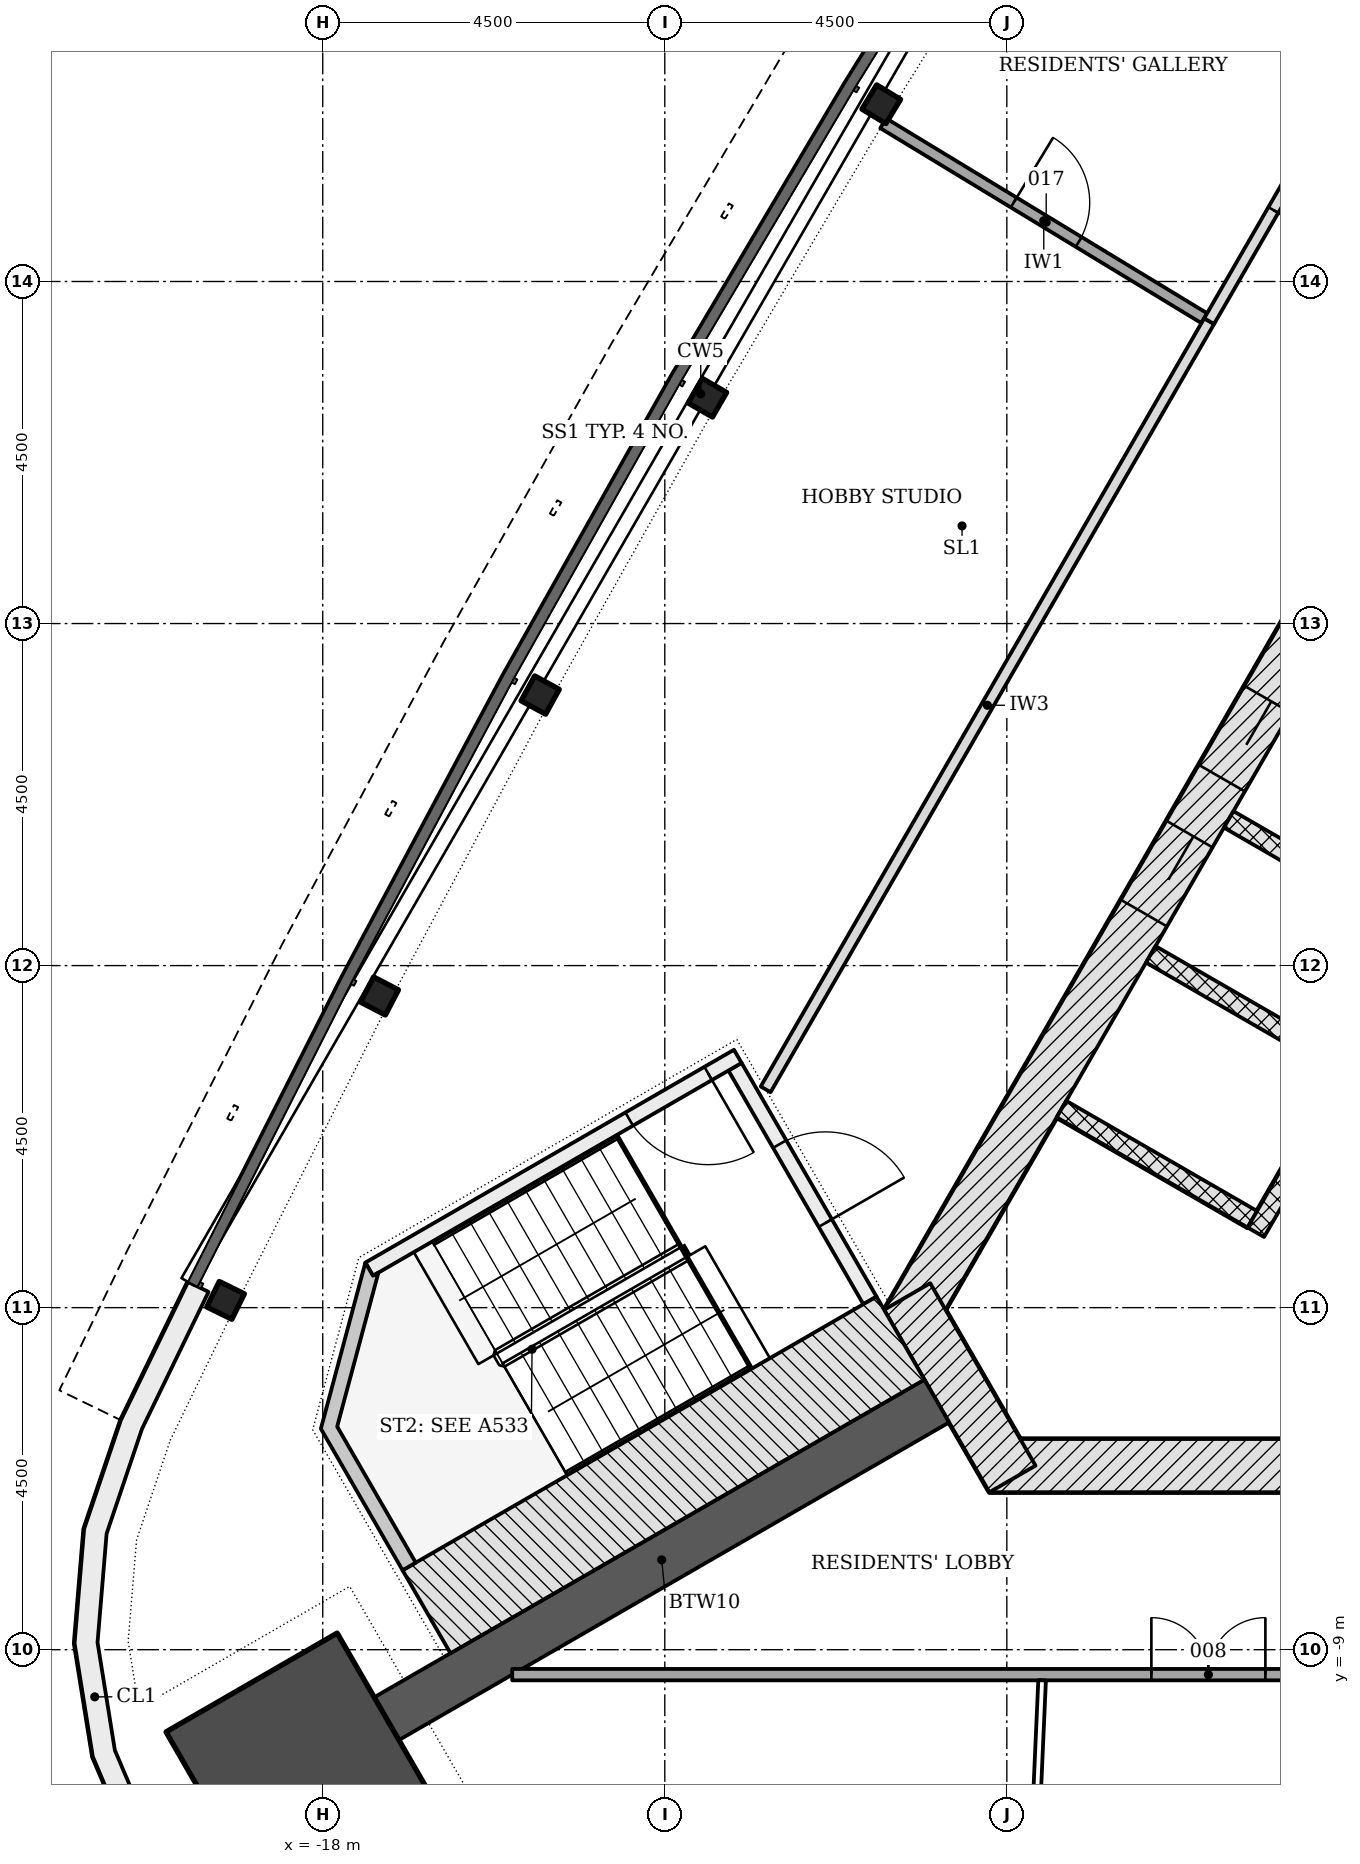
"""IFC4 building model, lengths in metres.
Left out: names, types, materials, properties, quantities, classifications, styles, units other than length and angle.
Written with IfcOpenShell. Run it as: python <this file> out.ifc"""

import sys

from ifc_helpers import new_model, si_unit, direction, frame, frame_2d, origin, origin_2d, place, context, subcontext, project, spatial, polyline, rectangle, i_section, outline, extrude, element, fill, save


model = new_model("IFC4")
c1 = context("Model", 3, precision=1e-05, world=origin(), true_north=direction((0.0, 1.0)))
c2 = subcontext(c1, "Body", "Model", "MODEL_VIEW")
j1 = project(units=[si_unit("LENGTHUNIT", "METRE"), si_unit("PLANEANGLEUNIT", "RADIAN")], contexts=[c1])
p1 = place(None, origin())
s1 = spatial("IfcSite", under=j1, at=p1, CompositionType="ELEMENT")
p2 = place(p1, origin())
s2 = spatial("IfcBuilding", under=s1, at=p2, CompositionType="ELEMENT")
p3 = place(p2, frame((0.0, 0.0, 222.0)))
s3 = spatial("IfcBuildingStorey", under=s2, at=p3, CompositionType="ELEMENT", Elevation=222.0)
p4 = place(p3, frame((-9.229, -6.578, -0.2), z_axis=(0.0, 0.0, 1.0), x_axis=(1.0, 0.0, 0.0)))
e1 = element("IfcWall", 1, at=p4, inside=s3, PredefinedType="SHEAR", context=c2, shape_type="SweptSolid", body=[
    extrude(rectangle(XDim=18.458, YDim=0.7, at=frame_2d((9.229, 0.0))), origin(), (0.0, 0.0, 1.0), 3.6),
])
p5 = place(p4, frame((10.7, 0.0, 0.2)))
e2 = element("IfcOpeningElement", 2, at=p5, cuts=e1, PredefinedType="OPENING", context=c2, shape_type="SweptSolid", body=[
    extrude(rectangle(XDim=1.0, YDim=2.1, at=frame_2d((0.5, 1.05))), frame((0.0, 0.36, 0.0), z_axis=(0.0, -1.0, 0.0), x_axis=(1.0, 0.0, 0.0)), (0.0, 0.0, 1.0), 0.72),
])
p6 = place(p4, frame((4.977, 0.0, 0.2)))
e3 = element("IfcOpeningElement", 3, at=p6, cuts=e1, PredefinedType="OPENING", context=c2, shape_type="SweptSolid", body=[
    extrude(rectangle(XDim=0.9, YDim=2.1, at=frame_2d((0.45, 1.05))), frame((0.0, 0.36, 0.0), z_axis=(0.0, -1.0, 0.0), x_axis=(1.0, 0.0, 0.0)), (0.0, 0.0, 1.0), 0.72),
])
p7 = place(p4, frame((14.552, 0.0, 0.2)))
e4 = element("IfcOpeningElement", 4, at=p7, cuts=e1, PredefinedType="OPENING", context=c2, shape_type="SweptSolid", body=[
    extrude(rectangle(XDim=0.9, YDim=2.1, at=frame_2d((0.45, 1.05))), frame((0.0, 0.36, 0.0), z_axis=(0.0, -1.0, 0.0), x_axis=(1.0, 0.0, 0.0)), (0.0, 0.0, 1.0), 0.72),
])
p8 = place(p3, frame((-1.083, 11.281, -0.2), z_axis=(0.0, 0.0, 1.0), x_axis=(-0.500001446645, -0.866024568562, 0.0)))
e5 = element("IfcWall", 5, at=p8, inside=s3, PredefinedType="SHEAR", context=c2, shape_type="SweptSolid", body=[
    extrude(rectangle(XDim=18.458, YDim=0.7, at=frame_2d((9.229, 0.0))), origin(), (0.0, 0.0, 1.0), 3.6),
])
p9 = place(p8, frame((8.979, 0.0, 0.2)))
e6 = element("IfcOpeningElement", 6, at=p9, cuts=e5, PredefinedType="OPENING", context=c2, shape_type="SweptSolid", body=[
    extrude(rectangle(XDim=1.2, YDim=2.1, at=frame_2d((0.6, 1.05))), frame((0.0, 0.36, 0.0), z_axis=(0.0, -1.0, 0.0), x_axis=(1.0, 0.0, 0.0)), (0.0, 0.0, 1.0), 0.72),
])
p10 = place(p8, frame((11.029, 0.0, 0.2)))
e7 = element("IfcOpeningElement", 7, at=p10, cuts=e5, PredefinedType="OPENING", context=c2, shape_type="SweptSolid", body=[
    extrude(rectangle(XDim=1.2, YDim=2.1, at=frame_2d((0.6, 1.05))), frame((0.0, 0.36, 0.0), z_axis=(0.0, -1.0, 0.0), x_axis=(1.0, 0.0, 0.0)), (0.0, 0.0, 1.0), 0.72),
])
p11 = place(p3, frame((-10.311, -4.353, -0.2), z_axis=(0.0, 0.0, 1.0), x_axis=(0.500042739161, -0.866000726912, 0.0)))
e8 = element("IfcWall", 8, at=p11, inside=s3, PredefinedType="SHEAR", context=c2, shape_type="SweptSolid", body=[
    extrude(rectangle(XDim=2.771, YDim=0.7, at=frame_2d((1.386, 0.0))), origin(), (0.0, 0.0, 1.0), 3.6),
])
p12 = place(p3, frame((-9.922, -5.728, -0.2), z_axis=(0.0, 0.0, 1.0), x_axis=(-0.866030911543, -0.499990460161, 0.0)))
e9 = element("IfcWall", 9, at=p12, inside=s3, PredefinedType="SHEAR", context=c2, shape_type="SweptSolid", body=[
    extrude(rectangle(XDim=8.359, YDim=0.65, at=frame_2d((4.179, 0.0))), origin(), (0.0, 0.0, 1.0), 3.6),
])
p13 = place(p3, frame((-18.286, -10.558, -0.2), z_axis=(0.0, 0.0, 1.0), x_axis=(-0.866025403784, -0.5, 0.0)))
e10 = element("IfcColumn", 10, at=p13, inside=s3, PredefinedType="COLUMN", context=c2, shape_type="SweptSolid", body=[
    extrude(rectangle(XDim=2.6, YDim=2.6, at=origin_2d()), origin(), (0.0, 0.0, 1.0), 3.6),
])
for number, where, z_axis, x_axis in (
    (11, (-10.652, 11.332, -0.2), (0.0, 0.0, 1.0), (-0.519, -0.855, 0.0)),
    (12, (-12.939, 7.47, -0.2), (0.0, 0.0, 1.0), (-0.5, -0.866, 0.0)),
    (13, (-15.14, 3.559, -0.2), (0.0, 0.0, 1.0), (-0.481, -0.877, 0.0)),
    (14, (-17.253, -0.4, -0.2), (0.0, 0.0, 1.0), (-0.461, -0.887, 0.0)),
    (15, (-19.279, -4.404, -0.2), (0.0, 0.0, 1.0), (-0.441, -0.897, 0.0)),
):
    element("IfcColumn", number, at=place(p3, frame(where, z_axis=z_axis, x_axis=x_axis)), inside=s3, PredefinedType="COLUMN", context=c2, shape_type="SweptSolid", body=[
        extrude(i_section(OverallWidth=0.373, OverallDepth=0.368, WebThickness=0.015, FlangeThickness=0.024, FilletRadius=0.015, at=origin_2d()), origin(), (0.0, 0.0, 1.0), 3.6),
    ])
p14 = place(p3, origin())
e16 = element("IfcWall", 16, at=p14, inside=s3, PredefinedType="NOTDEFINED", context=c2, shape_type="SweptSolid", body=[
    extrude(outline(polyline([(-19.772, -4.162), (-20.656, -5.98), (-21.139, -7.411), (-21.265, -8.917), (-21.025, -10.408), (-20.434, -11.797), (-19.526, -13.004), (-18.354, -13.958), (-16.988, -14.602), (-15.507, -14.898), (-15.448, -14.604), (-16.893, -14.315), (-18.193, -13.702), (-19.308, -12.795), (-20.172, -11.646), (-20.735, -10.324), (-20.963, -8.905), (-20.844, -7.473), (-20.378, -6.094), (-19.502, -4.293), (-19.772, -4.162)])), origin(), (0.0, 0.0, 1.0), 3.3),
])
for number, where, z_axis, x_axis in (
    (17, (-6.081, 1.923, -0.2), (0.0, 0.0, 1.0), (0.866, -0.5, 0.0)),
    (18, (-7.106, 0.148, -0.2), (0.0, 0.0, 1.0), (0.866, -0.5, 0.0)),
    (19, (-8.281, -1.887, -0.2), (0.0, 0.0, 1.0), (0.866, -0.5, 0.0)),
):
    element("IfcWall", number, at=place(p3, frame(where, z_axis=z_axis, x_axis=x_axis)), inside=s3, PredefinedType="PARTITIONING", context=c2, shape_type="SweptSolid", body=[
        extrude(rectangle(XDim=2.9, YDim=0.25, at=frame_2d((1.45, 0.0))), origin(), (0.0, 0.0, 1.0), 3.6),
    ])
p15 = place(p3, frame((-2.374, 2.294, 0.0), z_axis=(0.0, 0.0, 1.0), x_axis=(-0.500003174267, -0.866023571113, 0.0)))
e20 = element("IfcWall", 20, at=p15, inside=s3, PredefinedType="PARTITIONING", context=c2, shape_type="SweptSolid", body=[
    extrude(rectangle(XDim=6.7, YDim=0.25, at=frame_2d((3.35, 0.0))), origin(), (0.0, 0.0, 1.0), 3.4),
])
p16 = place(p3, frame((-12.576, -1.331, -0.2), z_axis=(0.0, 0.0, 1.0), x_axis=(0.499970499736, -0.8660424351, 0.0)))
e21 = element("IfcWall", 21, at=p16, inside=s3, PredefinedType="SHEAR", context=c2, shape_type="SweptSolid", body=[
    extrude(rectangle(XDim=3.55, YDim=0.2, at=frame_2d((1.775, 0.0))), origin(), (0.0, 0.0, 1.0), 3.6),
])
p17 = place(p16, frame((1.175, 0.0, 0.2)))
e22 = element("IfcOpeningElement", 22, at=p17, cuts=e21, PredefinedType="OPENING", context=c2, shape_type="SweptSolid", body=[
    extrude(rectangle(XDim=1.2, YDim=2.1, at=frame_2d((0.6, 1.05))), frame((0.0, 0.11, 0.0), z_axis=(0.0, -1.0, 0.0), x_axis=(1.0, 0.0, 0.0)), (0.0, 0.0, 1.0), 0.22),
])
p18 = place(p3, frame((-12.539, -1.194, -0.2), z_axis=(0.0, 0.0, 1.0), x_axis=(-0.866045472092, -0.499965239061, 0.0)))
e23 = element("IfcWall", 23, at=p18, inside=s3, PredefinedType="SHEAR", context=c2, shape_type="SweptSolid", body=[
    extrude(rectangle(XDim=5.6, YDim=0.2, at=frame_2d((2.8, 0.0))), origin(), (0.0, 0.0, 1.0), 3.6),
])
p19 = place(p18, frame((0.45, 0.0, 0.2)))
e24 = element("IfcOpeningElement", 24, at=p19, cuts=e23, PredefinedType="OPENING", context=c2, shape_type="SweptSolid", body=[
    extrude(rectangle(XDim=1.2, YDim=2.1, at=frame_2d((0.6, 1.05))), frame((0.0, 0.11, 0.0), z_axis=(0.0, -1.0, 0.0), x_axis=(1.0, 0.0, 0.0)), (0.0, 0.0, 1.0), 0.22),
])
p20 = place(p3, frame((-10.399, -4.901, -0.2), z_axis=(0.0, 0.0, 1.0), x_axis=(-0.866018442252, -0.500012057535, 0.0)))
e25 = element("IfcWall", 25, at=p20, inside=s3, PredefinedType="SHEAR", context=c2, shape_type="SweptSolid", body=[
    extrude(rectangle(XDim=7.2, YDim=1.261, at=frame_2d((3.6, 0.0))), origin(), (0.0, 0.0, 1.0), 3.6),
])
p21 = place(p3, frame((0.0, 0.0, -0.2)))
e26 = element("IfcWall", 26, at=p21, inside=s3, PredefinedType="SHEAR", context=c2, shape_type="SweptSolid", body=[
    extrude(outline(polyline([(-17.439, -3.907), (-18.025, -6.093), (-16.95, -7.955), (-16.777, -7.855), (-17.81, -6.065), (-17.267, -4.039), (-17.339, -4.081), (-17.339, -4.081), (-17.339, -4.081), (-17.339, -4.081), (-17.339, -4.081), (-17.339, -4.081), (-17.339, -4.081), (-17.339, -4.081), (-17.339, -4.081), (-17.339, -4.081), (-17.339, -4.081), (-17.339, -4.081), (-17.339, -4.081), (-17.339, -4.081), (-17.339, -4.081), (-17.339, -4.081), (-17.339, -4.081), (-17.439, -3.907)])), origin(), (0.0, 0.0, 1.0), 3.6),
])
p22 = place(p3, frame((-15.507, -9.328, 0.0), z_axis=(0.0, 0.0, 1.0), x_axis=(1.0, 0.0, 0.0)))
e27 = element("IfcWall", 27, at=p22, inside=s3, PredefinedType="PARTITIONING", context=c2, shape_type="SweptSolid", body=[
    extrude(rectangle(XDim=23.234, YDim=0.15, at=frame_2d((11.617, 0.0))), origin(), (0.0, 0.0, 1.0), 2.852),
])
p23 = place(p22, frame((8.408, 0.0, 0.0)))
e28 = element("IfcOpeningElement", 28, at=p23, cuts=e27, PredefinedType="OPENING", context=c2, shape_type="SweptSolid", body=[
    extrude(rectangle(XDim=1.5, YDim=2.1, at=frame_2d((0.75, 1.05))), frame((0.0, 0.085, 0.0), z_axis=(0.0, -1.0, 0.0), x_axis=(1.0, 0.0, 0.0)), (0.0, 0.0, 1.0), 0.17),
])
p24 = place(p22, frame((18.971, 0.0, 0.0)))
e29 = element("IfcOpeningElement", 29, at=p24, cuts=e27, PredefinedType="OPENING", context=c2, shape_type="SweptSolid", body=[
    extrude(rectangle(XDim=1.0, YDim=2.1, at=frame_2d((0.5, 1.05))), frame((0.0, 0.085, 0.0), z_axis=(0.0, -1.0, 0.0), x_axis=(1.0, 0.0, 0.0)), (0.0, 0.0, 1.0), 0.17),
])
p25 = place(p3, frame((-8.536, -9.403, 0.0), z_axis=(0.0, 0.0, 1.0), x_axis=(-0.044201203498, -0.999022649197, 0.0)))
e30 = element("IfcWall", 30, at=p25, inside=s3, PredefinedType="PARTITIONING", context=c2, shape_type="SweptSolid", body=[
    extrude(rectangle(XDim=3.883, YDim=0.1, at=frame_2d((1.941, 0.0))), origin(), (0.0, 0.0, 1.0), 3.4),
])
p26 = place(p25, frame((1.404, 0.0, 0.0)))
e31 = element("IfcOpeningElement", 31, at=p26, cuts=e30, PredefinedType="OPENING", context=c2, shape_type="SweptSolid", body=[
    extrude(rectangle(XDim=1.0, YDim=2.1, at=frame_2d((0.5, 1.05))), frame((0.0, 0.06, 0.0), z_axis=(0.0, -1.0, 0.0), x_axis=(1.0, 0.0, 0.0)), (0.0, 0.0, 1.0), 0.12),
])
p27 = place(p3, frame((-6.338, 8.478, 0.0), z_axis=(0.0, 0.0, 1.0), x_axis=(-0.499993497815, -0.86602915779, 0.0)))
e32 = element("IfcWall", 32, at=p27, inside=s3, PredefinedType="PARTITIONING", context=c2, shape_type="SweptSolid", body=[
    extrude(rectangle(XDim=11.67, YDim=0.15, at=frame_2d((5.835, 0.0))), origin(), (0.0, 0.0, 1.0), 2.852),
])
p28 = place(p3, frame((-10.626, 11.082, 0.0), z_axis=(0.0, 0.0, 1.0), x_axis=(0.854742891139, -0.519051625609, 0.0)))
e33 = element("IfcWall", 33, at=p28, inside=s3, PredefinedType="PARTITIONING", context=c2, shape_type="SweptSolid", body=[
    extrude(rectangle(XDim=4.941, YDim=0.15, at=frame_2d((2.471, 0.0))), origin(), (0.0, 0.0, 1.0), 3.4),
])
p29 = place(p28, frame((2.008, 0.0, 0.0)))
e34 = element("IfcOpeningElement", 34, at=p29, cuts=e33, PredefinedType="OPENING", context=c2, shape_type="SweptSolid", body=[
    extrude(rectangle(XDim=1.0, YDim=2.1, at=frame_2d((0.5, 1.05))), frame((0.0, 0.085, 0.0), z_axis=(0.0, -1.0, 0.0), x_axis=(1.0, 0.0, 0.0)), (0.0, 0.0, 1.0), 0.17),
])
p30 = place(p3, frame((-4.15, 12.269, 0.0), z_axis=(0.0, 0.0, 1.0), x_axis=(-0.499996027077, -0.86602769754, 0.0)))
e35 = element("IfcWall", 35, at=p30, inside=s3, PredefinedType="PARTITIONING", context=c2, shape_type="SweptSolid", body=[
    extrude(rectangle(XDim=4.377, YDim=0.15, at=frame_2d((2.189, 0.0))), origin(), (0.0, 0.0, 1.0), 2.852),
])
p31 = place(p30, frame((1.689, 0.0, 0.0)))
e36 = element("IfcOpeningElement", 36, at=p31, cuts=e35, PredefinedType="OPENING", context=c2, shape_type="SweptSolid", body=[
    extrude(rectangle(XDim=1.0, YDim=2.1, at=frame_2d((0.5, 1.05))), frame((0.0, 0.085, 0.0), z_axis=(0.0, -1.0, 0.0), x_axis=(1.0, 0.0, 0.0)), (0.0, 0.0, 1.0), 0.17),
])
p32 = place(p9, origin())
e37 = element("IfcDoor", 37, at=p32, inside=s3, OperationType="DOUBLE_DOOR_SLIDING", PredefinedType="DOOR", context=c2, shape_type="SweptSolid", body=[
    extrude(rectangle(XDim=1.2, YDim=2.1, at=frame_2d((0.6, 1.05))), frame((0.0, 0.025, 0.0), z_axis=(0.0, -1.0, 0.0), x_axis=(1.0, 0.0, 0.0)), (0.0, 0.0, 1.0), 0.05),
])
fill(e6, e37)
p33 = place(p10, origin())
e38 = element("IfcDoor", 38, at=p33, inside=s3, OperationType="DOUBLE_DOOR_SLIDING", PredefinedType="DOOR", context=c2, shape_type="SweptSolid", body=[
    extrude(rectangle(XDim=1.2, YDim=2.1, at=frame_2d((0.6, 1.05))), frame((0.0, 0.025, 0.0), z_axis=(0.0, -1.0, 0.0), x_axis=(1.0, 0.0, 0.0)), (0.0, 0.0, 1.0), 0.05),
])
fill(e7, e38)
p34 = place(p17, origin())
e39 = element("IfcDoor", 39, at=p34, inside=s3, OperationType="SINGLE_SWING_RIGHT", PredefinedType="DOOR", context=c2, shape_type="SweptSolid", body=[
    extrude(rectangle(XDim=1.2, YDim=2.1, at=frame_2d((0.6, 1.05))), frame((0.0, 0.025, 0.0), z_axis=(0.0, -1.0, 0.0), x_axis=(1.0, 0.0, 0.0)), (0.0, 0.0, 1.0), 0.05),
])
fill(e22, e39)
p35 = place(p19, origin())
e40 = element("IfcDoor", 40, at=p35, inside=s3, OperationType="SINGLE_SWING_LEFT", PredefinedType="DOOR", context=c2, shape_type="SweptSolid", body=[
    extrude(rectangle(XDim=1.2, YDim=2.1, at=frame_2d((0.6, 1.05))), frame((0.0, 0.025, 0.0), z_axis=(0.0, -1.0, 0.0), x_axis=(1.0, 0.0, 0.0)), (0.0, 0.0, 1.0), 0.05),
])
fill(e24, e40)
p36 = place(p23, origin())
e41 = element("IfcDoor", 41, at=p36, inside=s3, OperationType="DOUBLE_DOOR_SINGLE_SWING", PredefinedType="DOOR", context=c2, shape_type="SweptSolid", body=[
    extrude(rectangle(XDim=1.5, YDim=2.1, at=frame_2d((0.75, 1.05))), frame((0.0, 0.025, 0.0), z_axis=(0.0, -1.0, 0.0), x_axis=(1.0, 0.0, 0.0)), (0.0, 0.0, 1.0), 0.05),
])
fill(e28, e41)
p37 = place(p31, origin())
e42 = element("IfcDoor", 42, at=p37, inside=s3, OperationType="SINGLE_SWING_RIGHT", PredefinedType="DOOR", context=c2, shape_type="SweptSolid", body=[
    extrude(rectangle(XDim=1.0, YDim=2.1, at=frame_2d((0.5, 1.05))), frame((0.0, 0.025, 0.0), z_axis=(0.0, -1.0, 0.0), x_axis=(1.0, 0.0, 0.0)), (0.0, 0.0, 1.0), 0.05),
])
fill(e36, e42)
p38 = place(p29, origin())
e43 = element("IfcDoor", 43, at=p38, inside=s3, OperationType="SINGLE_SWING_LEFT", PredefinedType="DOOR", context=c2, shape_type="SweptSolid", body=[
    extrude(rectangle(XDim=1.0, YDim=2.1, at=frame_2d((0.5, 1.05))), frame((0.0, 0.025, 0.0), z_axis=(0.0, -1.0, 0.0), x_axis=(1.0, 0.0, 0.0)), (0.0, 0.0, 1.0), 0.05),
])
fill(e34, e43)
save(model, sys.argv[1])
